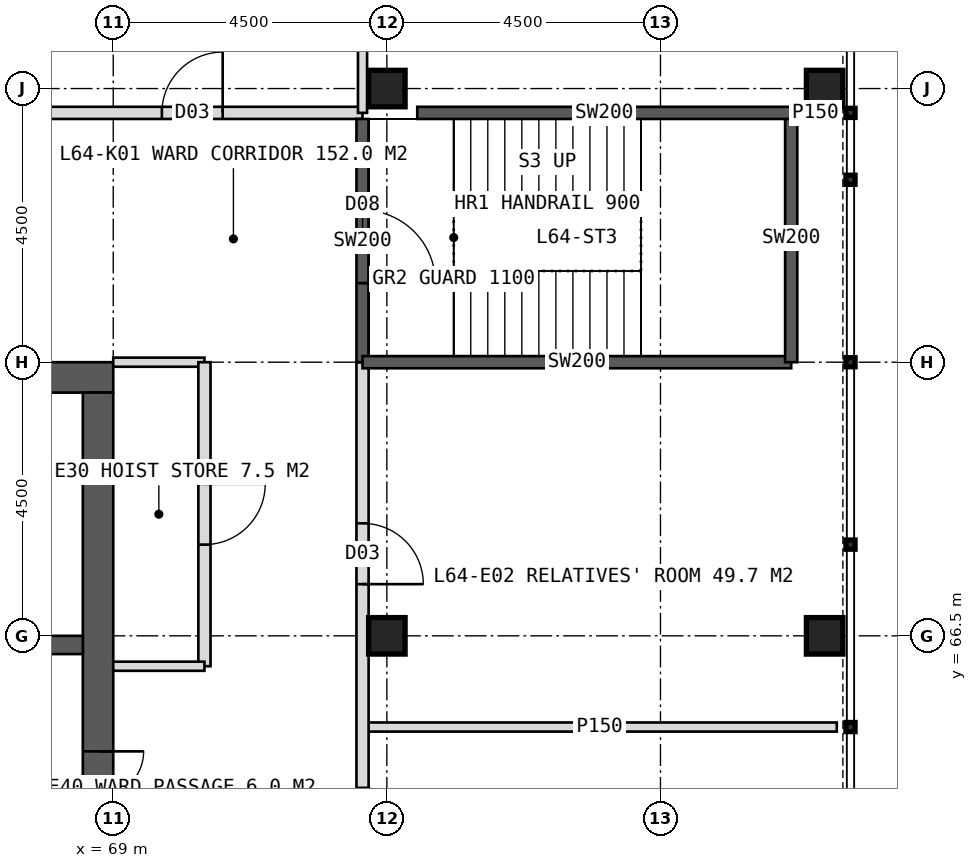
"""IFC4 building model, lengths in metres.
Left out: names, types, materials, properties, quantities, classifications, styles, units other than length and angle.
Written with IfcOpenShell. Run it as: python <this file> out.ifc"""

import sys

from ifc_helpers import new_model, si_unit, direction, frame, frame_2d, origin, origin_2d, place, context, subcontext, project, spatial, rectangle, hollow_rectangle, extrude, element, fill, save


model = new_model("IFC4")
c1 = context("Model", 3, precision=1e-05, world=origin(), true_north=direction((0.0, 1.0)))
c2 = subcontext(c1, "Body", "Model", "MODEL_VIEW")
j1 = project(units=[si_unit("LENGTHUNIT", "METRE"), si_unit("PLANEANGLEUNIT", "RADIAN")], contexts=[c1])
p1 = place(None, origin())
s1 = spatial("IfcSite", under=j1, at=p1, CompositionType="ELEMENT")
p2 = place(p1, origin())
s2 = spatial("IfcBuilding", under=s1, at=p2, CompositionType="ELEMENT")
p3 = place(p2, frame((0.0, 0.0, 266.0)))
s3 = spatial("IfcBuildingStorey", under=s2, at=p3, CompositionType="ELEMENT", Elevation=266.0)
p4 = place(p3, frame((51.0, 70.75, 0.0), z_axis=(0.0, 0.0, 1.0), x_axis=(1.0, 0.0, 0.0)))
e1 = element("IfcWall", 1, at=p4, inside=s3, PredefinedType="SHEAR", context=c2, shape_type="SweptSolid", body=[
    extrude(rectangle(XDim=18.0, YDim=0.5, at=frame_2d((9.0, 0.0))), origin(), (0.0, 0.0, 1.0), 4.0),
])
p5 = place(p4, frame((8.1, 0.0, 0.0)))
e2 = element("IfcOpeningElement", 2, at=p5, cuts=e1, PredefinedType="OPENING", context=c2, shape_type="SweptSolid", body=[
    extrude(rectangle(XDim=1.8, YDim=2.2, at=frame_2d((0.9, 1.1))), frame((0.0, 0.26, 0.0), z_axis=(0.0, -1.0, 0.0), x_axis=(1.0, 0.0, 0.0)), (0.0, 0.0, 1.0), 0.52),
])
p6 = place(p3, frame((68.75, 53.5, 0.0), z_axis=(0.0, 0.0, 1.0), x_axis=(0.0, 1.0, 0.0)))
e3 = element("IfcWall", 3, at=p6, inside=s3, PredefinedType="SHEAR", context=c2, shape_type="SweptSolid", body=[
    extrude(rectangle(XDim=17.0, YDim=0.5, at=frame_2d((8.5, 0.0))), origin(), (0.0, 0.0, 1.0), 4.0),
])
p7 = place(p6, frame((9.6, 0.0, 0.0)))
e4 = element("IfcOpeningElement", 4, at=p7, cuts=e3, PredefinedType="OPENING", context=c2, shape_type="SweptSolid", body=[
    extrude(rectangle(XDim=1.5, YDim=2.2, at=frame_2d((0.75, 1.1))), frame((0.0, 0.26, 0.0), z_axis=(0.0, -1.0, 0.0), x_axis=(1.0, 0.0, 0.0)), (0.0, 0.0, 1.0), 0.52),
])
p8 = place(p3, frame((65.2, 66.35, 0.0), z_axis=(0.0, 0.0, 1.0), x_axis=(1.0, 0.0, 0.0)))
e5 = element("IfcWall", 5, at=p8, inside=s3, PredefinedType="SHEAR", context=c2, shape_type="SweptSolid", body=[
    extrude(rectangle(XDim=3.3, YDim=0.3, at=frame_2d((1.65, 0.0))), origin(), (0.0, 0.0, 1.0), 4.0),
])
p9 = place(p8, frame((1.05, 0.0, 0.0)))
e6 = element("IfcOpeningElement", 6, at=p9, cuts=e5, PredefinedType="OPENING", context=c2, shape_type="SweptSolid", body=[
    extrude(rectangle(XDim=1.2, YDim=2.2, at=frame_2d((0.6, 1.1))), frame((0.0, 0.16, 0.0), z_axis=(0.0, -1.0, 0.0), x_axis=(1.0, 0.0, 0.0)), (0.0, 0.0, 1.0), 0.32),
])
for number, where, z_axis, x_axis in (
    (7, (73.5, 75.5, 0.0), (0.0, 0.0, 1.0), (1.0, 0.0, 0.0)),
    (8, (73.5, 66.5, 0.0), (0.0, 0.0, 1.0), (1.0, 0.0, 0.0)),
    (9, (80.7, 66.5, 0.0), (0.0, 0.0, 1.0), (1.0, 0.0, 0.0)),
    (10, (80.7, 75.5, 0.0), (0.0, 0.0, 1.0), (1.0, 0.0, 0.0)),
):
    element("IfcColumn", number, at=place(p3, frame(where, z_axis=z_axis, x_axis=x_axis)), inside=s3, PredefinedType="COLUMN", context=c2, shape_type="SweptSolid", body=[
        extrude(hollow_rectangle(XDim=0.6, YDim=0.6, WallThickness=0.04, at=origin_2d()), origin(), (0.0, 0.0, 1.0), 4.0),
    ])
p10 = place(p3, frame((46.9, 75.1, 0.0), z_axis=(0.0, 0.0, 1.0), x_axis=(1.0, 0.0, 0.0)))
e11 = element("IfcWall", 11, at=p10, inside=s3, PredefinedType="PARTITIONING", context=c2, shape_type="SweptSolid", body=[
    extrude(rectangle(XDim=26.2, YDim=0.2, at=frame_2d((13.1, 0.0))), origin(), (0.0, 0.0, 1.0), 3.75),
])
p11 = place(p10, frame((1.55, 0.0, 0.0)))
e12 = element("IfcOpeningElement", 12, at=p11, cuts=e11, PredefinedType="OPENING", context=c2, shape_type="SweptSolid", body=[
    extrude(rectangle(XDim=1.0, YDim=2.1, at=frame_2d((0.5, 1.05))), frame((0.0, 0.11, 0.0), z_axis=(0.0, -1.0, 0.0), x_axis=(1.0, 0.0, 0.0)), (0.0, 0.0, 1.0), 0.22),
])
p12 = place(p10, frame((6.6, 0.0, 0.0)))
e13 = element("IfcOpeningElement", 13, at=p12, cuts=e11, PredefinedType="OPENING", context=c2, shape_type="SweptSolid", body=[
    extrude(rectangle(XDim=1.0, YDim=2.1, at=frame_2d((0.5, 1.05))), frame((0.0, 0.11, 0.0), z_axis=(0.0, -1.0, 0.0), x_axis=(1.0, 0.0, 0.0)), (0.0, 0.0, 1.0), 0.22),
])
p13 = place(p10, frame((12.75, 0.0, 0.0)))
e14 = element("IfcOpeningElement", 14, at=p13, cuts=e11, PredefinedType="OPENING", context=c2, shape_type="SweptSolid", body=[
    extrude(rectangle(XDim=1.2, YDim=2.2, at=frame_2d((0.6, 1.1))), frame((0.0, 0.11, 0.0), z_axis=(0.0, -1.0, 0.0), x_axis=(1.0, 0.0, 0.0)), (0.0, 0.0, 1.0), 0.22),
])
p14 = place(p10, frame((18.45, 0.0, 0.0)))
e15 = element("IfcOpeningElement", 15, at=p14, cuts=e11, PredefinedType="OPENING", context=c2, shape_type="SweptSolid", body=[
    extrude(rectangle(XDim=1.0, YDim=2.1, at=frame_2d((0.5, 1.05))), frame((0.0, 0.11, 0.0), z_axis=(0.0, -1.0, 0.0), x_axis=(1.0, 0.0, 0.0)), (0.0, 0.0, 1.0), 0.22),
])
p15 = place(p10, frame((22.9, 0.0, 0.0)))
e16 = element("IfcOpeningElement", 16, at=p15, cuts=e11, PredefinedType="OPENING", context=c2, shape_type="SweptSolid", body=[
    extrude(rectangle(XDim=1.0, YDim=2.1, at=frame_2d((0.5, 1.05))), frame((0.0, 0.11, 0.0), z_axis=(0.0, -1.0, 0.0), x_axis=(1.0, 0.0, 0.0)), (0.0, 0.0, 1.0), 0.22),
])
p16 = place(p3, frame((73.1, 75.1, 0.0), z_axis=(0.0, 0.0, 1.0), x_axis=(0.0, 1.0, 0.0)))
e17 = element("IfcWall", 17, at=p16, inside=s3, PredefinedType="PARTITIONING", context=c2, shape_type="SweptSolid", body=[
    extrude(rectangle(XDim=7.8, YDim=0.15, at=frame_2d((3.9, 0.0))), origin(), (0.0, 0.0, 1.0), 3.75),
])
p17 = place(p16, frame((4.3, 0.0, 0.0)))
e18 = element("IfcOpeningElement", 18, at=p17, cuts=e17, PredefinedType="OPENING", context=c2, shape_type="SweptSolid", body=[
    extrude(rectangle(XDim=1.0, YDim=2.1, at=frame_2d((0.5, 1.05))), frame((0.0, 0.085, 0.0), z_axis=(0.0, -1.0, 0.0), x_axis=(1.0, 0.0, 0.0)), (0.0, 0.0, 1.0), 0.17),
])
p18 = place(p3, frame((73.1, 65.0, 0.0), z_axis=(0.0, 0.0, 1.0), x_axis=(1.0, 0.0, 0.0)))
e19 = element("IfcWall", 19, at=p18, inside=s3, PredefinedType="PARTITIONING", context=c2, shape_type="SweptSolid", body=[
    extrude(rectangle(XDim=7.8, YDim=0.15, at=frame_2d((3.9, 0.0))), origin(), (0.0, 0.0, 1.0), 3.75),
])
p19 = place(p3, frame((73.1, 71.0, 0.0), z_axis=(0.0, 0.0, 1.0), x_axis=(0.0, -1.0, 0.0)))
e20 = element("IfcWall", 20, at=p19, inside=s3, PredefinedType="PARTITIONING", context=c2, shape_type="SweptSolid", body=[
    extrude(rectangle(XDim=22.1, YDim=0.2, at=frame_2d((11.05, 0.0))), origin(), (0.0, 0.0, 1.0), 3.75),
])
p20 = place(p19, frame((2.65, 0.0, 0.0)))
e21 = element("IfcOpeningElement", 21, at=p20, cuts=e20, PredefinedType="OPENING", context=c2, shape_type="SweptSolid", body=[
    extrude(rectangle(XDim=1.0, YDim=2.1, at=frame_2d((0.5, 1.05))), frame((0.0, 0.11, 0.0), z_axis=(0.0, -1.0, 0.0), x_axis=(1.0, 0.0, 0.0)), (0.0, 0.0, 1.0), 0.22),
])
p21 = place(p19, frame((7.0, 0.0, 0.0)))
e22 = element("IfcOpeningElement", 22, at=p21, cuts=e20, PredefinedType="OPENING", context=c2, shape_type="SweptSolid", body=[
    extrude(rectangle(XDim=1.0, YDim=2.1, at=frame_2d((0.5, 1.05))), frame((0.0, 0.11, 0.0), z_axis=(0.0, -1.0, 0.0), x_axis=(1.0, 0.0, 0.0)), (0.0, 0.0, 1.0), 0.22),
])
p22 = place(p19, frame((14.35, 0.0, 0.0)))
e23 = element("IfcOpeningElement", 23, at=p22, cuts=e20, PredefinedType="OPENING", context=c2, shape_type="SweptSolid", body=[
    extrude(rectangle(XDim=1.2, YDim=2.2, at=frame_2d((0.6, 1.1))), frame((0.0, 0.11, 0.0), z_axis=(0.0, -1.0, 0.0), x_axis=(1.0, 0.0, 0.0)), (0.0, 0.0, 1.0), 0.22),
])
p23 = place(p19, frame((18.7, 0.0, 0.0)))
e24 = element("IfcOpeningElement", 24, at=p23, cuts=e20, PredefinedType="OPENING", context=c2, shape_type="SweptSolid", body=[
    extrude(rectangle(XDim=1.2, YDim=2.2, at=frame_2d((0.6, 1.1))), frame((0.0, 0.11, 0.0), z_axis=(0.0, -1.0, 0.0), x_axis=(1.0, 0.0, 0.0)), (0.0, 0.0, 1.0), 0.22),
])
p24 = place(p3, frame((80.2, 75.1, 0.0), z_axis=(0.0, 0.0, 1.0), x_axis=(1.0, 0.0, 0.0)))
e25 = element("IfcWall", 25, at=p24, inside=s3, PredefinedType="PARTITIONING", context=c2, shape_type="SweptSolid", body=[
    extrude(rectangle(XDim=0.7, YDim=0.15, at=frame_2d((0.35, 0.0))), origin(), (0.0, 0.0, 1.0), 3.75),
])
p25 = place(p3, frame((69.0, 71.0, 0.0), z_axis=(0.0, 0.0, 1.0), x_axis=(1.0, 0.0, 0.0)))
e26 = element("IfcWall", 26, at=p25, inside=s3, PredefinedType="PARTITIONING", context=c2, shape_type="SweptSolid", body=[
    extrude(rectangle(XDim=1.5, YDim=0.15, at=frame_2d((0.75, 0.0))), origin(), (0.0, 0.0, 1.0), 3.75),
])
p26 = place(p3, frame((70.5, 71.0, 0.0), z_axis=(0.0, 0.0, 1.0), x_axis=(0.0, -1.0, 0.0)))
e27 = element("IfcWall", 27, at=p26, inside=s3, PredefinedType="PARTITIONING", context=c2, shape_type="SweptSolid", body=[
    extrude(rectangle(XDim=5.0, YDim=0.2, at=frame_2d((2.5, 0.0))), origin(), (0.0, 0.0, 1.0), 3.75),
])
p27 = place(p26, frame((2.0, 0.0, 0.0)))
e28 = element("IfcOpeningElement", 28, at=p27, cuts=e27, PredefinedType="OPENING", context=c2, shape_type="SweptSolid", body=[
    extrude(rectangle(XDim=1.0, YDim=2.1, at=frame_2d((0.5, 1.05))), frame((0.0, 0.11, 0.0), z_axis=(0.0, -1.0, 0.0), x_axis=(1.0, 0.0, 0.0)), (0.0, 0.0, 1.0), 0.22),
])
p28 = place(p3, frame((69.0, 66.0, 0.0), z_axis=(0.0, 0.0, 1.0), x_axis=(1.0, 0.0, 0.0)))
e29 = element("IfcWall", 29, at=p28, inside=s3, PredefinedType="PARTITIONING", context=c2, shape_type="SweptSolid", body=[
    extrude(rectangle(XDim=1.5, YDim=0.15, at=frame_2d((0.75, 0.0))), origin(), (0.0, 0.0, 1.0), 3.75),
])
p29 = place(p3, frame((73.1, 75.0, 0.0), z_axis=(0.0, 0.0, 1.0), x_axis=(0.0, -1.0, 0.0)))
e30 = element("IfcWall", 30, at=p29, inside=s3, PredefinedType="SOLIDWALL", context=c2, shape_type="SweptSolid", body=[
    extrude(rectangle(XDim=4.0, YDim=0.2, at=frame_2d((2.0, 0.0))), origin(), (0.0, 0.0, 1.0), 3.75),
])
p30 = place(p29, frame((1.5, 0.0, 0.0)))
e31 = element("IfcOpeningElement", 31, at=p30, cuts=e30, PredefinedType="OPENING", context=c2, shape_type="SweptSolid", body=[
    extrude(rectangle(XDim=1.2, YDim=2.1, at=frame_2d((0.6, 1.05))), frame((0.0, 0.11, 0.0), z_axis=(0.0, -1.0, 0.0), x_axis=(1.0, 0.0, 0.0)), (0.0, 0.0, 1.0), 0.22),
])
p31 = place(p3, frame((73.1, 71.0, 0.0), z_axis=(0.0, 0.0, 1.0), x_axis=(1.0, 0.0, 0.0)))
e32 = element("IfcWall", 32, at=p31, inside=s3, PredefinedType="SOLIDWALL", context=c2, shape_type="SweptSolid", body=[
    extrude(rectangle(XDim=7.05, YDim=0.2, at=frame_2d((3.525, 0.0))), origin(), (0.0, 0.0, 1.0), 3.75),
])
p32 = place(p3, frame((80.15, 71.0, 0.0), z_axis=(0.0, 0.0, 1.0), x_axis=(0.0, 1.0, 0.0)))
e33 = element("IfcWall", 33, at=p32, inside=s3, PredefinedType="SOLIDWALL", context=c2, shape_type="SweptSolid", body=[
    extrude(rectangle(XDim=4.1, YDim=0.2, at=frame_2d((2.05, 0.0))), origin(), (0.0, 0.0, 1.0), 3.75),
])
p33 = place(p3, frame((74.0, 75.1, 0.0), z_axis=(0.0, 0.0, 1.0), x_axis=(1.0, 0.0, 0.0)))
e34 = element("IfcWall", 34, at=p33, inside=s3, PredefinedType="SOLIDWALL", context=c2, shape_type="SweptSolid", body=[
    extrude(rectangle(XDim=6.15, YDim=0.2, at=frame_2d((3.075, 0.0))), origin(), (0.0, 0.0, 1.0), 3.75),
])
p34 = place(p15, origin())
e35 = element("IfcDoor", 35, at=p34, inside=s3, OperationType="SINGLE_SWING_RIGHT", PredefinedType="DOOR", context=c2, shape_type="SweptSolid", body=[
    extrude(rectangle(XDim=1.0, YDim=2.1, at=frame_2d((0.5, 1.05))), frame((0.0, 0.025, 0.0), z_axis=(0.0, -1.0, 0.0), x_axis=(1.0, 0.0, 0.0)), (0.0, 0.0, 1.0), 0.05),
])
fill(e16, e35)
p35 = place(p20, origin())
e36 = element("IfcDoor", 36, at=p35, inside=s3, OperationType="SINGLE_SWING_RIGHT", PredefinedType="DOOR", context=c2, shape_type="SweptSolid", body=[
    extrude(rectangle(XDim=1.0, YDim=2.1, at=frame_2d((0.5, 1.05))), frame((0.0, 0.025, 0.0), z_axis=(0.0, -1.0, 0.0), x_axis=(1.0, 0.0, 0.0)), (0.0, 0.0, 1.0), 0.05),
])
fill(e21, e36)
p36 = place(p27, origin())
e37 = element("IfcDoor", 37, at=p36, inside=s3, OperationType="SINGLE_SWING_LEFT", PredefinedType="DOOR", context=c2, shape_type="SweptSolid", body=[
    extrude(rectangle(XDim=1.0, YDim=2.1, at=frame_2d((0.5, 1.05))), frame((0.0, 0.025, 0.0), z_axis=(0.0, -1.0, 0.0), x_axis=(1.0, 0.0, 0.0)), (0.0, 0.0, 1.0), 0.05),
])
fill(e28, e37)
p37 = place(p7, origin())
e38 = element("IfcDoor", 38, at=p37, inside=s3, OperationType="DOUBLE_DOOR_SINGLE_SWING", PredefinedType="DOOR", context=c2, shape_type="SweptSolid", body=[
    extrude(rectangle(XDim=1.5, YDim=2.2, at=frame_2d((0.75, 1.1))), frame((0.0, 0.025, 0.0), z_axis=(0.0, -1.0, 0.0), x_axis=(1.0, 0.0, 0.0)), (0.0, 0.0, 1.0), 0.05),
])
fill(e4, e38)
p38 = place(p30, origin())
e39 = element("IfcDoor", 39, at=p38, inside=s3, OperationType="SINGLE_SWING_RIGHT", PredefinedType="DOOR", context=c2, shape_type="SweptSolid", body=[
    extrude(rectangle(XDim=1.2, YDim=2.1, at=frame_2d((0.6, 1.05))), frame((0.0, 0.025, 0.0), z_axis=(0.0, -1.0, 0.0), x_axis=(1.0, 0.0, 0.0)), (0.0, 0.0, 1.0), 0.05),
])
fill(e31, e39)
save(model, sys.argv[1])
